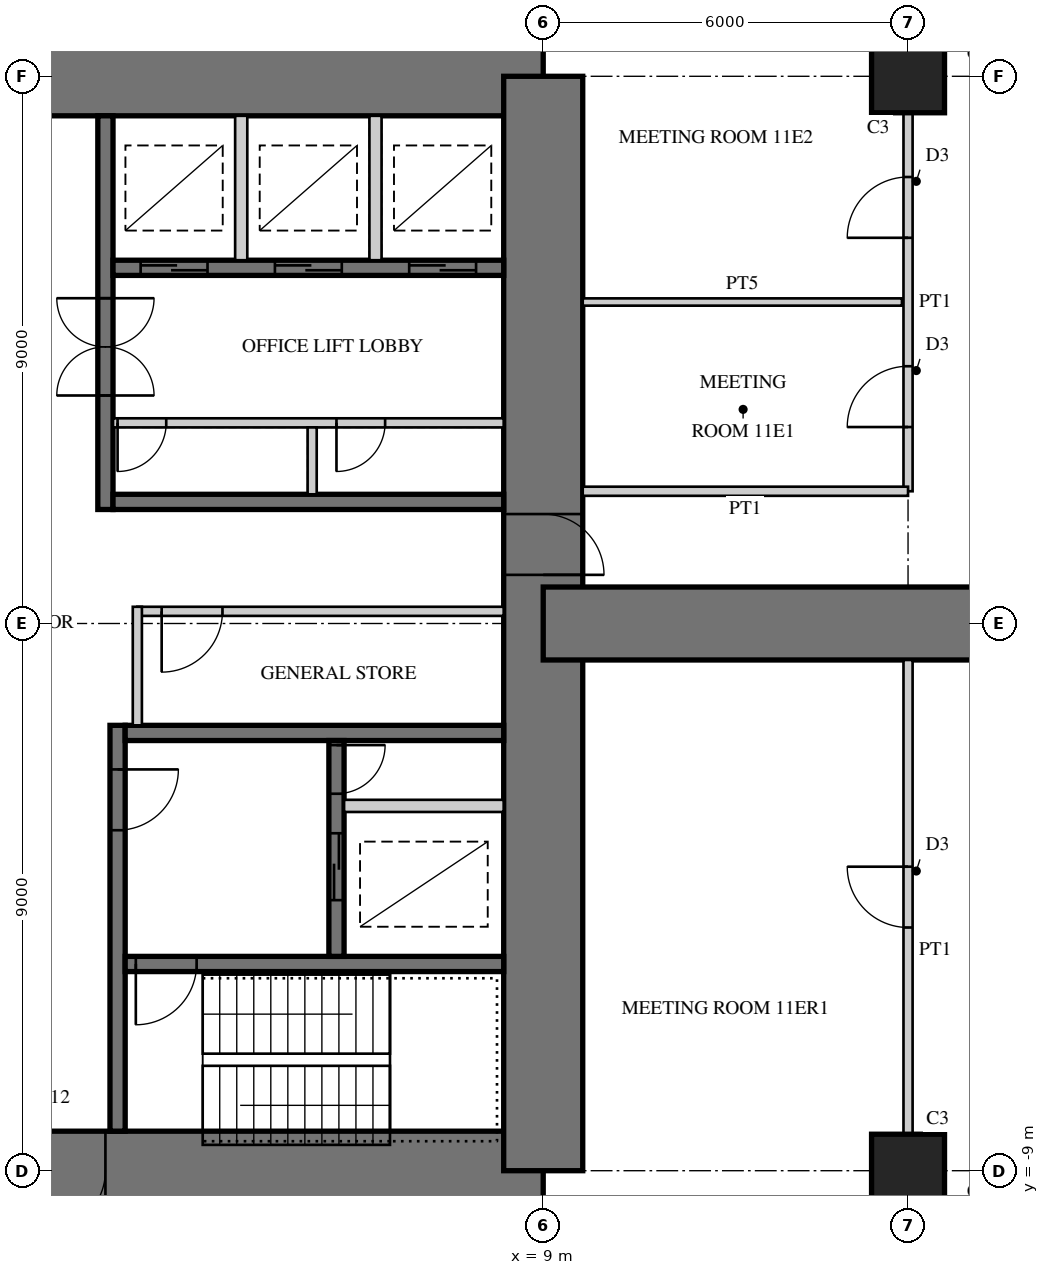
"""IFC4 building model, lengths in metres.
Left out: names, types, materials, properties, quantities, classifications, styles, units other than length and angle.
Written with IfcOpenShell. Run it as: python <this file> out.ifc"""

import sys

from ifc_helpers import new_model, si_unit, direction, frame, frame_2d, origin, origin_2d, place, context, subcontext, project, spatial, rectangle, extrude, element, fill, save


model = new_model("IFC4")
c1 = context("Model", 3, precision=1e-05, world=origin(), true_north=direction((0.0, 1.0)))
c2 = subcontext(c1, "Body", "Model", "MODEL_VIEW")
j1 = project(units=[si_unit("LENGTHUNIT", "METRE"), si_unit("PLANEANGLEUNIT", "RADIAN")], contexts=[c1])
p1 = place(None, origin())
s1 = spatial("IfcSite", under=j1, at=p1, CompositionType="ELEMENT")
p2 = place(p1, origin())
s2 = spatial("IfcBuilding", under=s1, at=p2, CompositionType="ELEMENT")
p3 = place(p2, frame((0.0, 0.0, 47.5)))
s3 = spatial("IfcBuildingStorey", under=s2, at=p3, CompositionType="ELEMENT", Elevation=47.5)
p4 = place(p3, frame((9.0, 9.0, 0.0), z_axis=(0.0, 0.0, 1.0), x_axis=(-1.0, 0.0, 0.0)))
e1 = element("IfcWall", 1, at=p4, inside=s3, PredefinedType="SHEAR", context=c2, shape_type="SweptSolid", body=[
    extrude(rectangle(XDim=18.0, YDim=1.3, at=frame_2d((9.0, 0.0))), origin(), (0.0, 0.0, 1.0), 4.0),
])
p5 = place(p4, frame((9.8, 0.0, 0.0)))
e2 = element("IfcOpeningElement", 2, at=p5, cuts=e1, PredefinedType="OPENING", context=c2, shape_type="SweptSolid", body=[
    extrude(rectangle(XDim=1.0, YDim=2.4, at=frame_2d((0.5, 1.2))), frame((0.0, 0.66, 0.0), z_axis=(0.0, -1.0, 0.0), x_axis=(1.0, 0.0, 0.0)), (0.0, 0.0, 1.0), 1.32),
])
p6 = place(p3, frame((-9.0, -9.0, 0.0), z_axis=(0.0, 0.0, 1.0), x_axis=(1.0, 0.0, 0.0)))
e3 = element("IfcWall", 3, at=p6, inside=s3, PredefinedType="SHEAR", context=c2, shape_type="SweptSolid", body=[
    extrude(rectangle(XDim=18.0, YDim=1.3, at=frame_2d((9.0, 0.0))), origin(), (0.0, 0.0, 1.0), 4.0),
])
p7 = place(p6, frame((9.8, 0.0, 0.0)))
e4 = element("IfcOpeningElement", 4, at=p7, cuts=e3, PredefinedType="OPENING", context=c2, shape_type="SweptSolid", body=[
    extrude(rectangle(XDim=1.0, YDim=2.4, at=frame_2d((0.5, 1.2))), frame((0.0, 0.66, 0.0), z_axis=(0.0, -1.0, 0.0), x_axis=(1.0, 0.0, 0.0)), (0.0, 0.0, 1.0), 1.32),
])
p8 = place(p3, frame((9.0, -9.0, 0.0), z_axis=(0.0, 0.0, 1.0), x_axis=(0.0, 1.0, 0.0)))
e5 = element("IfcWall", 5, at=p8, inside=s3, PredefinedType="SHEAR", context=c2, shape_type="SweptSolid", body=[
    extrude(rectangle(XDim=18.0, YDim=1.3, at=frame_2d((9.0, 0.0))), origin(), (0.0, 0.0, 1.0), 4.0),
])
p9 = place(p8, frame((9.8, 0.0, 0.0)))
e6 = element("IfcOpeningElement", 6, at=p9, cuts=e5, PredefinedType="OPENING", context=c2, shape_type="SweptSolid", body=[
    extrude(rectangle(XDim=1.0, YDim=2.4, at=frame_2d((0.5, 1.2))), frame((0.0, 0.66, 0.0), z_axis=(0.0, -1.0, 0.0), x_axis=(1.0, 0.0, 0.0)), (0.0, 0.0, 1.0), 1.32),
])
p10 = place(p3, frame((1.8, 1.875, 0.0), z_axis=(0.0, 0.0, 1.0), x_axis=(0.0, 1.0, 0.0)))
e7 = element("IfcWall", 7, at=p10, inside=s3, PredefinedType="SHEAR", context=c2, shape_type="SweptSolid", body=[
    extrude(rectangle(XDim=6.475, YDim=0.25, at=frame_2d((3.238, 0.0))), origin(), (0.0, 0.0, 1.0), 4.0),
])
p11 = place(p10, frame((1.875, 0.0, 0.0)))
e8 = element("IfcOpeningElement", 8, at=p11, cuts=e7, PredefinedType="OPENING", context=c2, shape_type="SweptSolid", body=[
    extrude(rectangle(XDim=1.6, YDim=2.4, at=frame_2d((0.8, 1.2))), frame((0.0, 0.135, 0.0), z_axis=(0.0, -1.0, 0.0), x_axis=(1.0, 0.0, 0.0)), (0.0, 0.0, 1.0), 0.27),
])
p12 = place(p3, frame((1.925, 2.0, 0.0), z_axis=(0.0, 0.0, 1.0), x_axis=(1.0, 0.0, 0.0)))
e9 = element("IfcWall", 9, at=p12, inside=s3, PredefinedType="SHEAR", context=c2, shape_type="SweptSolid", body=[
    extrude(rectangle(XDim=6.425, YDim=0.25, at=frame_2d((3.212, 0.0))), origin(), (0.0, 0.0, 1.0), 4.0),
])
p13 = place(p3, frame((1.925, 5.85, 0.0), z_axis=(0.0, 0.0, 1.0), x_axis=(1.0, 0.0, 0.0)))
e10 = element("IfcWall", 10, at=p13, inside=s3, PredefinedType="SHEAR", context=c2, shape_type="SweptSolid", body=[
    extrude(rectangle(XDim=6.425, YDim=0.25, at=frame_2d((3.212, 0.0))), origin(), (0.0, 0.0, 1.0), 4.0),
])
p14 = place(p13, frame((0.454, 0.0, 0.0)))
e11 = element("IfcOpeningElement", 11, at=p14, cuts=e10, PredefinedType="OPENING", context=c2, shape_type="SweptSolid", body=[
    extrude(rectangle(XDim=1.1, YDim=2.2, at=frame_2d((0.55, 1.1))), frame((0.0, 0.135, 0.0), z_axis=(0.0, -1.0, 0.0), x_axis=(1.0, 0.0, 0.0)), (0.0, 0.0, 1.0), 0.27),
])
p15 = place(p13, frame((2.663, 0.0, 0.0)))
e12 = element("IfcOpeningElement", 12, at=p15, cuts=e10, PredefinedType="OPENING", context=c2, shape_type="SweptSolid", body=[
    extrude(rectangle(XDim=1.1, YDim=2.2, at=frame_2d((0.55, 1.1))), frame((0.0, 0.135, 0.0), z_axis=(0.0, -1.0, 0.0), x_axis=(1.0, 0.0, 0.0)), (0.0, 0.0, 1.0), 0.27),
])
p16 = place(p13, frame((4.871, 0.0, 0.0)))
e13 = element("IfcOpeningElement", 13, at=p16, cuts=e10, PredefinedType="OPENING", context=c2, shape_type="SweptSolid", body=[
    extrude(rectangle(XDim=1.1, YDim=2.2, at=frame_2d((0.55, 1.1))), frame((0.0, 0.135, 0.0), z_axis=(0.0, -1.0, 0.0), x_axis=(1.0, 0.0, 0.0)), (0.0, 0.0, 1.0), 0.27),
])
p17 = place(p3, frame((1.925, 3.3, 0.0), z_axis=(0.0, 0.0, 1.0), x_axis=(1.0, 0.0, 0.0)))
e14 = element("IfcWall", 14, at=p17, inside=s3, PredefinedType="PARTITIONING", context=c2, shape_type="SweptSolid", body=[
    extrude(rectangle(XDim=6.425, YDim=0.15, at=frame_2d((3.212, 0.0))), origin(), (0.0, 0.0, 1.0), 4.0),
])
p18 = place(p17, frame((0.075, 0.0, 0.0)))
e15 = element("IfcOpeningElement", 15, at=p18, cuts=e14, PredefinedType="OPENING", context=c2, shape_type="SweptSolid", body=[
    extrude(rectangle(XDim=0.8, YDim=2.1, at=frame_2d((0.4, 1.05))), frame((0.0, 0.085, 0.0), z_axis=(0.0, -1.0, 0.0), x_axis=(1.0, 0.0, 0.0)), (0.0, 0.0, 1.0), 0.17),
])
p19 = place(p17, frame((3.675, 0.0, 0.0)))
e16 = element("IfcOpeningElement", 16, at=p19, cuts=e14, PredefinedType="OPENING", context=c2, shape_type="SweptSolid", body=[
    extrude(rectangle(XDim=0.8, YDim=2.1, at=frame_2d((0.4, 1.05))), frame((0.0, 0.085, 0.0), z_axis=(0.0, -1.0, 0.0), x_axis=(1.0, 0.0, 0.0)), (0.0, 0.0, 1.0), 0.17),
])
p20 = place(p3, frame((5.2, 2.125, 0.0), z_axis=(0.0, 0.0, 1.0), x_axis=(0.0, 1.0, 0.0)))
e17 = element("IfcWall", 17, at=p20, inside=s3, PredefinedType="PARTITIONING", context=c2, shape_type="SweptSolid", body=[
    extrude(rectangle(XDim=1.1, YDim=0.15, at=frame_2d((0.55, 0.0))), origin(), (0.0, 0.0, 1.0), 4.0),
])
for number, where, z_axis, x_axis in (
    (18, (4.033, 5.975, 0.0), (0.0, 0.0, 1.0), (0.0, 1.0, 0.0)),
    (19, (6.242, 5.975, 0.0), (0.0, 0.0, 1.0), (0.0, 1.0, 0.0)),
):
    element("IfcWall", number, at=place(p3, frame(where, z_axis=z_axis, x_axis=x_axis)), inside=s3, PredefinedType="PARTITIONING", context=c2, shape_type="SweptSolid", body=[
        extrude(rectangle(XDim=2.375, YDim=0.2, at=frame_2d((1.188, 0.0))), origin(), (0.0, 0.0, 1.0), 4.0),
    ])
p21 = place(p3, frame((2.0, -1.675, 0.0), z_axis=(0.0, 0.0, 1.0), x_axis=(0.0, -1.0, 0.0)))
e20 = element("IfcWall", 20, at=p21, inside=s3, PredefinedType="SHEAR", context=c2, shape_type="SweptSolid", body=[
    extrude(rectangle(XDim=6.675, YDim=0.25, at=frame_2d((3.337, 0.0))), origin(), (0.0, 0.0, 1.0), 4.0),
])
p22 = place(p21, frame((0.725, 0.0, 0.0)))
e21 = element("IfcOpeningElement", 21, at=p22, cuts=e20, PredefinedType="OPENING", context=c2, shape_type="SweptSolid", body=[
    extrude(rectangle(XDim=1.0, YDim=2.1, at=frame_2d((0.5, 1.05))), frame((0.0, 0.135, 0.0), z_axis=(0.0, -1.0, 0.0), x_axis=(1.0, 0.0, 0.0)), (0.0, 0.0, 1.0), 0.27),
])
p23 = place(p3, frame((2.125, -1.8, 0.0), z_axis=(0.0, 0.0, 1.0), x_axis=(1.0, 0.0, 0.0)))
e22 = element("IfcWall", 22, at=p23, inside=s3, PredefinedType="SHEAR", context=c2, shape_type="SweptSolid", body=[
    extrude(rectangle(XDim=6.225, YDim=0.25, at=frame_2d((3.113, 0.0))), origin(), (0.0, 0.0, 1.0), 4.0),
])
p24 = place(p3, frame((2.125, -5.6, 0.0), z_axis=(0.0, 0.0, 1.0), x_axis=(1.0, 0.0, 0.0)))
e23 = element("IfcWall", 23, at=p24, inside=s3, PredefinedType="SHEAR", context=c2, shape_type="SweptSolid", body=[
    extrude(rectangle(XDim=6.225, YDim=0.25, at=frame_2d((3.113, 0.0))), origin(), (0.0, 0.0, 1.0), 4.0),
])
p25 = place(p24, frame((0.175, 0.0, 0.0)))
e24 = element("IfcOpeningElement", 24, at=p25, cuts=e23, PredefinedType="OPENING", context=c2, shape_type="SweptSolid", body=[
    extrude(rectangle(XDim=1.0, YDim=2.1, at=frame_2d((0.5, 1.05))), frame((0.0, 0.135, 0.0), z_axis=(0.0, -1.0, 0.0), x_axis=(1.0, 0.0, 0.0)), (0.0, 0.0, 1.0), 0.27),
])
p26 = place(p3, frame((5.6, -1.925, 0.0), z_axis=(0.0, 0.0, 1.0), x_axis=(0.0, -1.0, 0.0)))
e25 = element("IfcWall", 25, at=p26, inside=s3, PredefinedType="SHEAR", context=c2, shape_type="SweptSolid", body=[
    extrude(rectangle(XDim=3.55, YDim=0.25, at=frame_2d((1.775, 0.0))), origin(), (0.0, 0.0, 1.0), 4.0),
])
p27 = place(p26, frame((1.525, 0.0, 0.0)))
e26 = element("IfcOpeningElement", 26, at=p27, cuts=e25, PredefinedType="OPENING", context=c2, shape_type="SweptSolid", body=[
    extrude(rectangle(XDim=1.1, YDim=2.2, at=frame_2d((0.55, 1.1))), frame((0.0, 0.135, 0.0), z_axis=(0.0, -1.0, 0.0), x_axis=(1.0, 0.0, 0.0)), (0.0, 0.0, 1.0), 0.27),
])
p28 = place(p26, frame((0.075, 0.0, 0.0)))
e27 = element("IfcOpeningElement", 27, at=p28, cuts=e25, PredefinedType="OPENING", context=c2, shape_type="SweptSolid", body=[
    extrude(rectangle(XDim=0.8, YDim=2.1, at=frame_2d((0.4, 1.05))), frame((0.0, 0.135, 0.0), z_axis=(0.0, -1.0, 0.0), x_axis=(1.0, 0.0, 0.0)), (0.0, 0.0, 1.0), 0.27),
])
p29 = place(p3, frame((5.725, -3.0, 0.0), z_axis=(0.0, 0.0, 1.0), x_axis=(1.0, 0.0, 0.0)))
e28 = element("IfcWall", 28, at=p29, inside=s3, PredefinedType="PARTITIONING", context=c2, shape_type="SweptSolid", body=[
    extrude(rectangle(XDim=2.625, YDim=0.2, at=frame_2d((1.312, 0.0))), origin(), (0.0, 0.0, 1.0), 4.0),
])
p30 = place(p3, frame((9.0, 0.0, 0.0), z_axis=(0.0, 0.0, 1.0), x_axis=(1.0, 0.0, 0.0)))
e29 = element("IfcWall", 29, at=p30, inside=s3, PredefinedType="SHEAR", context=c2, shape_type="SweptSolid", body=[
    extrude(rectangle(XDim=18.0, YDim=1.2, at=frame_2d((9.0, 0.0))), origin(), (0.0, 0.0, 1.0), 4.0),
])
p31 = place(p30, frame((9.9, 0.0, 0.0)))
e30 = element("IfcOpeningElement", 30, at=p31, cuts=e29, PredefinedType="OPENING", context=c2, shape_type="SweptSolid", body=[
    extrude(rectangle(XDim=1.0, YDim=2.2, at=frame_2d((0.5, 1.1))), frame((0.0, 0.61, 0.0), z_axis=(0.0, -1.0, 0.0), x_axis=(1.0, 0.0, 0.0)), (0.0, 0.0, 1.0), 1.22),
])
for number, where, z_axis, x_axis in (
    (31, (15.0, -9.0, 0.0), (0.0, 0.0, 1.0), (1.0, 0.0, 0.0)),
    (32, (15.0, 9.0, 0.0), (0.0, 0.0, 1.0), (1.0, 0.0, 0.0)),
):
    element("IfcColumn", number, at=place(p3, frame(where, z_axis=z_axis, x_axis=x_axis)), inside=s3, PredefinedType="COLUMN", context=c2, shape_type="SweptSolid", body=[
        extrude(rectangle(XDim=1.2, YDim=1.2, at=origin_2d()), origin(), (0.0, 0.0, 1.0), 4.0),
    ])
p32 = place(p3, frame((2.325, 0.2, 0.0), z_axis=(0.0, 0.0, 1.0), x_axis=(1.0, 0.0, 0.0)))
e33 = element("IfcWall", 33, at=p32, inside=s3, PredefinedType="PARTITIONING", context=c2, shape_type="SweptSolid", body=[
    extrude(rectangle(XDim=6.025, YDim=0.15, at=frame_2d((3.013, 0.0))), origin(), (0.0, 0.0, 1.0), 3.8),
])
p33 = place(p32, frame((0.4, 0.0, 0.0)))
e34 = element("IfcOpeningElement", 34, at=p33, cuts=e33, PredefinedType="OPENING", context=c2, shape_type="SweptSolid", body=[
    extrude(rectangle(XDim=1.0, YDim=2.1, at=frame_2d((0.5, 1.05))), frame((0.0, 0.085, 0.0), z_axis=(0.0, -1.0, 0.0), x_axis=(1.0, 0.0, 0.0)), (0.0, 0.0, 1.0), 0.17),
])
p34 = place(p3, frame((2.325, -1.675, 0.0), z_axis=(0.0, 0.0, 1.0), x_axis=(0.0, 1.0, 0.0)))
e35 = element("IfcWall", 35, at=p34, inside=s3, PredefinedType="PARTITIONING", context=c2, shape_type="SweptSolid", body=[
    extrude(rectangle(XDim=1.95, YDim=0.15, at=frame_2d((0.975, 0.0))), origin(), (0.0, 0.0, 1.0), 3.8),
])
p35 = place(p3, frame((15.0, 2.175, 0.0), z_axis=(0.0, 0.0, 1.0), x_axis=(0.0, 1.0, 0.0)))
e36 = element("IfcWall", 36, at=p35, inside=s3, PredefinedType="PARTITIONING", context=c2, shape_type="SweptSolid", body=[
    extrude(rectangle(XDim=6.225, YDim=0.15, at=frame_2d((3.112, 0.0))), origin(), (0.0, 0.0, 1.0), 2.95),
])
p36 = place(p35, frame((1.056, 0.0, 0.0)))
e37 = element("IfcOpeningElement", 37, at=p36, cuts=e36, PredefinedType="OPENING", context=c2, shape_type="SweptSolid", body=[
    extrude(rectangle(XDim=1.0, YDim=2.1, at=frame_2d((0.5, 1.05))), frame((0.0, 0.085, 0.0), z_axis=(0.0, -1.0, 0.0), x_axis=(1.0, 0.0, 0.0)), (0.0, 0.0, 1.0), 0.17),
])
p37 = place(p35, frame((4.169, 0.0, 0.0)))
e38 = element("IfcOpeningElement", 38, at=p37, cuts=e36, PredefinedType="OPENING", context=c2, shape_type="SweptSolid", body=[
    extrude(rectangle(XDim=1.0, YDim=2.1, at=frame_2d((0.5, 1.05))), frame((0.0, 0.085, 0.0), z_axis=(0.0, -1.0, 0.0), x_axis=(1.0, 0.0, 0.0)), (0.0, 0.0, 1.0), 0.17),
])
p38 = place(p3, frame((9.65, 2.175, 0.0), z_axis=(0.0, 0.0, 1.0), x_axis=(1.0, 0.0, 0.0)))
e39 = element("IfcWall", 39, at=p38, inside=s3, PredefinedType="PARTITIONING", context=c2, shape_type="SweptSolid", body=[
    extrude(rectangle(XDim=5.35, YDim=0.15, at=frame_2d((2.675, 0.0))), origin(), (0.0, 0.0, 1.0), 3.8),
])
p39 = place(p3, frame((9.65, 5.288, 0.0), z_axis=(0.0, 0.0, 1.0), x_axis=(1.0, 0.0, 0.0)))
e40 = element("IfcWall", 40, at=p39, inside=s3, PredefinedType="PLUMBINGWALL", context=c2, shape_type="SweptSolid", body=[
    extrude(rectangle(XDim=5.25, YDim=0.12, at=frame_2d((2.625, 0.0))), origin(), (0.0, 0.0, 1.0), 3.8),
])
p40 = place(p3, frame((15.0, -8.4, 0.0), z_axis=(0.0, 0.0, 1.0), x_axis=(0.0, 1.0, 0.0)))
e41 = element("IfcWall", 41, at=p40, inside=s3, PredefinedType="PARTITIONING", context=c2, shape_type="SweptSolid", body=[
    extrude(rectangle(XDim=7.8, YDim=0.15, at=frame_2d((3.9, 0.0))), origin(), (0.0, 0.0, 1.0), 2.95),
])
p41 = place(p40, frame((3.4, 0.0, 0.0)))
e42 = element("IfcOpeningElement", 42, at=p41, cuts=e41, PredefinedType="OPENING", context=c2, shape_type="SweptSolid", body=[
    extrude(rectangle(XDim=1.0, YDim=2.1, at=frame_2d((0.5, 1.05))), frame((0.0, 0.085, 0.0), z_axis=(0.0, -1.0, 0.0), x_axis=(1.0, 0.0, 0.0)), (0.0, 0.0, 1.0), 0.17),
])
p42 = place(p33, frame((1.0, 0.0, 0.0), z_axis=(0.0, 0.0, 1.0), x_axis=(-1.0, 0.0, 0.0)))
e43 = element("IfcDoor", 43, at=p42, inside=s3, OperationType="SINGLE_SWING_RIGHT", PredefinedType="DOOR", context=c2, shape_type="SweptSolid", body=[
    extrude(rectangle(XDim=1.0, YDim=2.1, at=frame_2d((0.5, 1.05))), frame((0.0, 0.025, 0.0), z_axis=(0.0, -1.0, 0.0), x_axis=(1.0, 0.0, 0.0)), (0.0, 0.0, 1.0), 0.05),
])
fill(e34, e43)
p43 = place(p36, origin())
e44 = element("IfcDoor", 44, at=p43, inside=s3, OperationType="SINGLE_SWING_LEFT", PredefinedType="DOOR", context=c2, shape_type="SweptSolid", body=[
    extrude(rectangle(XDim=1.0, YDim=2.1, at=frame_2d((0.5, 1.05))), frame((0.0, 0.025, 0.0), z_axis=(0.0, -1.0, 0.0), x_axis=(1.0, 0.0, 0.0)), (0.0, 0.0, 1.0), 0.05),
])
fill(e37, e44)
p44 = place(p37, origin())
e45 = element("IfcDoor", 45, at=p44, inside=s3, OperationType="SINGLE_SWING_LEFT", PredefinedType="DOOR", context=c2, shape_type="SweptSolid", body=[
    extrude(rectangle(XDim=1.0, YDim=2.1, at=frame_2d((0.5, 1.05))), frame((0.0, 0.025, 0.0), z_axis=(0.0, -1.0, 0.0), x_axis=(1.0, 0.0, 0.0)), (0.0, 0.0, 1.0), 0.05),
])
fill(e38, e45)
p45 = place(p41, origin())
e46 = element("IfcDoor", 46, at=p45, inside=s3, OperationType="SINGLE_SWING_RIGHT", PredefinedType="DOOR", context=c2, shape_type="SweptSolid", body=[
    extrude(rectangle(XDim=1.0, YDim=2.1, at=frame_2d((0.5, 1.05))), frame((0.0, 0.025, 0.0), z_axis=(0.0, -1.0, 0.0), x_axis=(1.0, 0.0, 0.0)), (0.0, 0.0, 1.0), 0.05),
])
fill(e42, e46)
p46 = place(p7, frame((1.0, 0.0, 0.0), z_axis=(0.0, 0.0, 1.0), x_axis=(-1.0, 0.0, 0.0)))
e47 = element("IfcDoor", 47, at=p46, inside=s3, OperationType="SINGLE_SWING_RIGHT", PredefinedType="DOOR", context=c2, shape_type="SweptSolid", body=[
    extrude(rectangle(XDim=1.0, YDim=2.4, at=frame_2d((0.5, 1.2))), frame((0.0, -0.005, 0.0), z_axis=(0.0, -1.0, 0.0), x_axis=(1.0, 0.0, 0.0)), (0.0, 0.0, 1.0), 0.05),
])
fill(e4, e47)
p47 = place(p9, frame((1.0, 0.0, 0.0), z_axis=(0.0, 0.0, 1.0), x_axis=(-1.0, 0.0, 0.0)))
e48 = element("IfcDoor", 48, at=p47, inside=s3, OperationType="SINGLE_SWING_RIGHT", PredefinedType="DOOR", context=c2, shape_type="SweptSolid", body=[
    extrude(rectangle(XDim=1.0, YDim=2.4, at=frame_2d((0.5, 1.2))), frame((0.0, -0.005, 0.0), z_axis=(0.0, -1.0, 0.0), x_axis=(1.0, 0.0, 0.0)), (0.0, 0.0, 1.0), 0.05),
])
fill(e6, e48)
p48 = place(p14, origin())
e49 = element("IfcDoor", 49, at=p48, inside=s3, OperationType="DOUBLE_DOOR_SLIDING", PredefinedType="DOOR", context=c2, shape_type="SweptSolid", body=[
    extrude(rectangle(XDim=1.1, YDim=2.2, at=frame_2d((0.55, 1.1))), frame((0.0, 0.025, 0.0), z_axis=(0.0, -1.0, 0.0), x_axis=(1.0, 0.0, 0.0)), (0.0, 0.0, 1.0), 0.05),
])
fill(e11, e49)
p49 = place(p15, origin())
e50 = element("IfcDoor", 50, at=p49, inside=s3, OperationType="DOUBLE_DOOR_SLIDING", PredefinedType="DOOR", context=c2, shape_type="SweptSolid", body=[
    extrude(rectangle(XDim=1.1, YDim=2.2, at=frame_2d((0.55, 1.1))), frame((0.0, 0.025, 0.0), z_axis=(0.0, -1.0, 0.0), x_axis=(1.0, 0.0, 0.0)), (0.0, 0.0, 1.0), 0.05),
])
fill(e12, e50)
p50 = place(p16, origin())
e51 = element("IfcDoor", 51, at=p50, inside=s3, OperationType="DOUBLE_DOOR_SLIDING", PredefinedType="DOOR", context=c2, shape_type="SweptSolid", body=[
    extrude(rectangle(XDim=1.1, YDim=2.2, at=frame_2d((0.55, 1.1))), frame((0.0, 0.025, 0.0), z_axis=(0.0, -1.0, 0.0), x_axis=(1.0, 0.0, 0.0)), (0.0, 0.0, 1.0), 0.05),
])
fill(e13, e51)
p51 = place(p11, origin())
e52 = element("IfcDoor", 52, at=p51, inside=s3, OperationType="DOUBLE_DOOR_DOUBLE_SWING", PredefinedType="DOOR", context=c2, shape_type="SweptSolid", body=[
    extrude(rectangle(XDim=1.6, YDim=2.4, at=frame_2d((0.8, 1.2))), frame((0.0, 0.025, 0.0), z_axis=(0.0, -1.0, 0.0), x_axis=(1.0, 0.0, 0.0)), (0.0, 0.0, 1.0), 0.05),
])
fill(e8, e52)
p52 = place(p18, frame((0.8, 0.0, 0.0), z_axis=(0.0, 0.0, 1.0), x_axis=(-1.0, 0.0, 0.0)))
e53 = element("IfcDoor", 53, at=p52, inside=s3, OperationType="SINGLE_SWING_RIGHT", PredefinedType="DOOR", context=c2, shape_type="SweptSolid", body=[
    extrude(rectangle(XDim=0.8, YDim=2.1, at=frame_2d((0.4, 1.05))), frame((0.0, 0.025, 0.0), z_axis=(0.0, -1.0, 0.0), x_axis=(1.0, 0.0, 0.0)), (0.0, 0.0, 1.0), 0.05),
])
fill(e15, e53)
p53 = place(p19, frame((0.8, 0.0, 0.0), z_axis=(0.0, 0.0, 1.0), x_axis=(-1.0, 0.0, 0.0)))
e54 = element("IfcDoor", 54, at=p53, inside=s3, OperationType="SINGLE_SWING_RIGHT", PredefinedType="DOOR", context=c2, shape_type="SweptSolid", body=[
    extrude(rectangle(XDim=0.8, YDim=2.1, at=frame_2d((0.4, 1.05))), frame((0.0, 0.025, 0.0), z_axis=(0.0, -1.0, 0.0), x_axis=(1.0, 0.0, 0.0)), (0.0, 0.0, 1.0), 0.05),
])
fill(e16, e54)
p54 = place(p22, origin())
e55 = element("IfcDoor", 55, at=p54, inside=s3, OperationType="SINGLE_SWING_LEFT", PredefinedType="DOOR", context=c2, shape_type="SweptSolid", body=[
    extrude(rectangle(XDim=1.0, YDim=2.1, at=frame_2d((0.5, 1.05))), frame((0.0, 0.025, 0.0), z_axis=(0.0, -1.0, 0.0), x_axis=(1.0, 0.0, 0.0)), (0.0, 0.0, 1.0), 0.05),
])
fill(e21, e55)
p55 = place(p25, frame((1.0, 0.0, 0.0), z_axis=(0.0, 0.0, 1.0), x_axis=(-1.0, 0.0, 0.0)))
e56 = element("IfcDoor", 56, at=p55, inside=s3, OperationType="SINGLE_SWING_RIGHT", PredefinedType="DOOR", context=c2, shape_type="SweptSolid", body=[
    extrude(rectangle(XDim=1.0, YDim=2.1, at=frame_2d((0.5, 1.05))), frame((0.0, 0.025, 0.0), z_axis=(0.0, -1.0, 0.0), x_axis=(1.0, 0.0, 0.0)), (0.0, 0.0, 1.0), 0.05),
])
fill(e24, e56)
p56 = place(p27, origin())
e57 = element("IfcDoor", 57, at=p56, inside=s3, OperationType="DOUBLE_DOOR_SLIDING", PredefinedType="DOOR", context=c2, shape_type="SweptSolid", body=[
    extrude(rectangle(XDim=1.1, YDim=2.2, at=frame_2d((0.55, 1.1))), frame((0.0, 0.025, 0.0), z_axis=(0.0, -1.0, 0.0), x_axis=(1.0, 0.0, 0.0)), (0.0, 0.0, 1.0), 0.05),
])
fill(e26, e57)
p57 = place(p28, origin())
e58 = element("IfcDoor", 58, at=p57, inside=s3, OperationType="SINGLE_SWING_LEFT", PredefinedType="DOOR", context=c2, shape_type="SweptSolid", body=[
    extrude(rectangle(XDim=0.8, YDim=2.1, at=frame_2d((0.4, 1.05))), frame((0.0, 0.025, 0.0), z_axis=(0.0, -1.0, 0.0), x_axis=(1.0, 0.0, 0.0)), (0.0, 0.0, 1.0), 0.05),
])
fill(e27, e58)
save(model, sys.argv[1])
